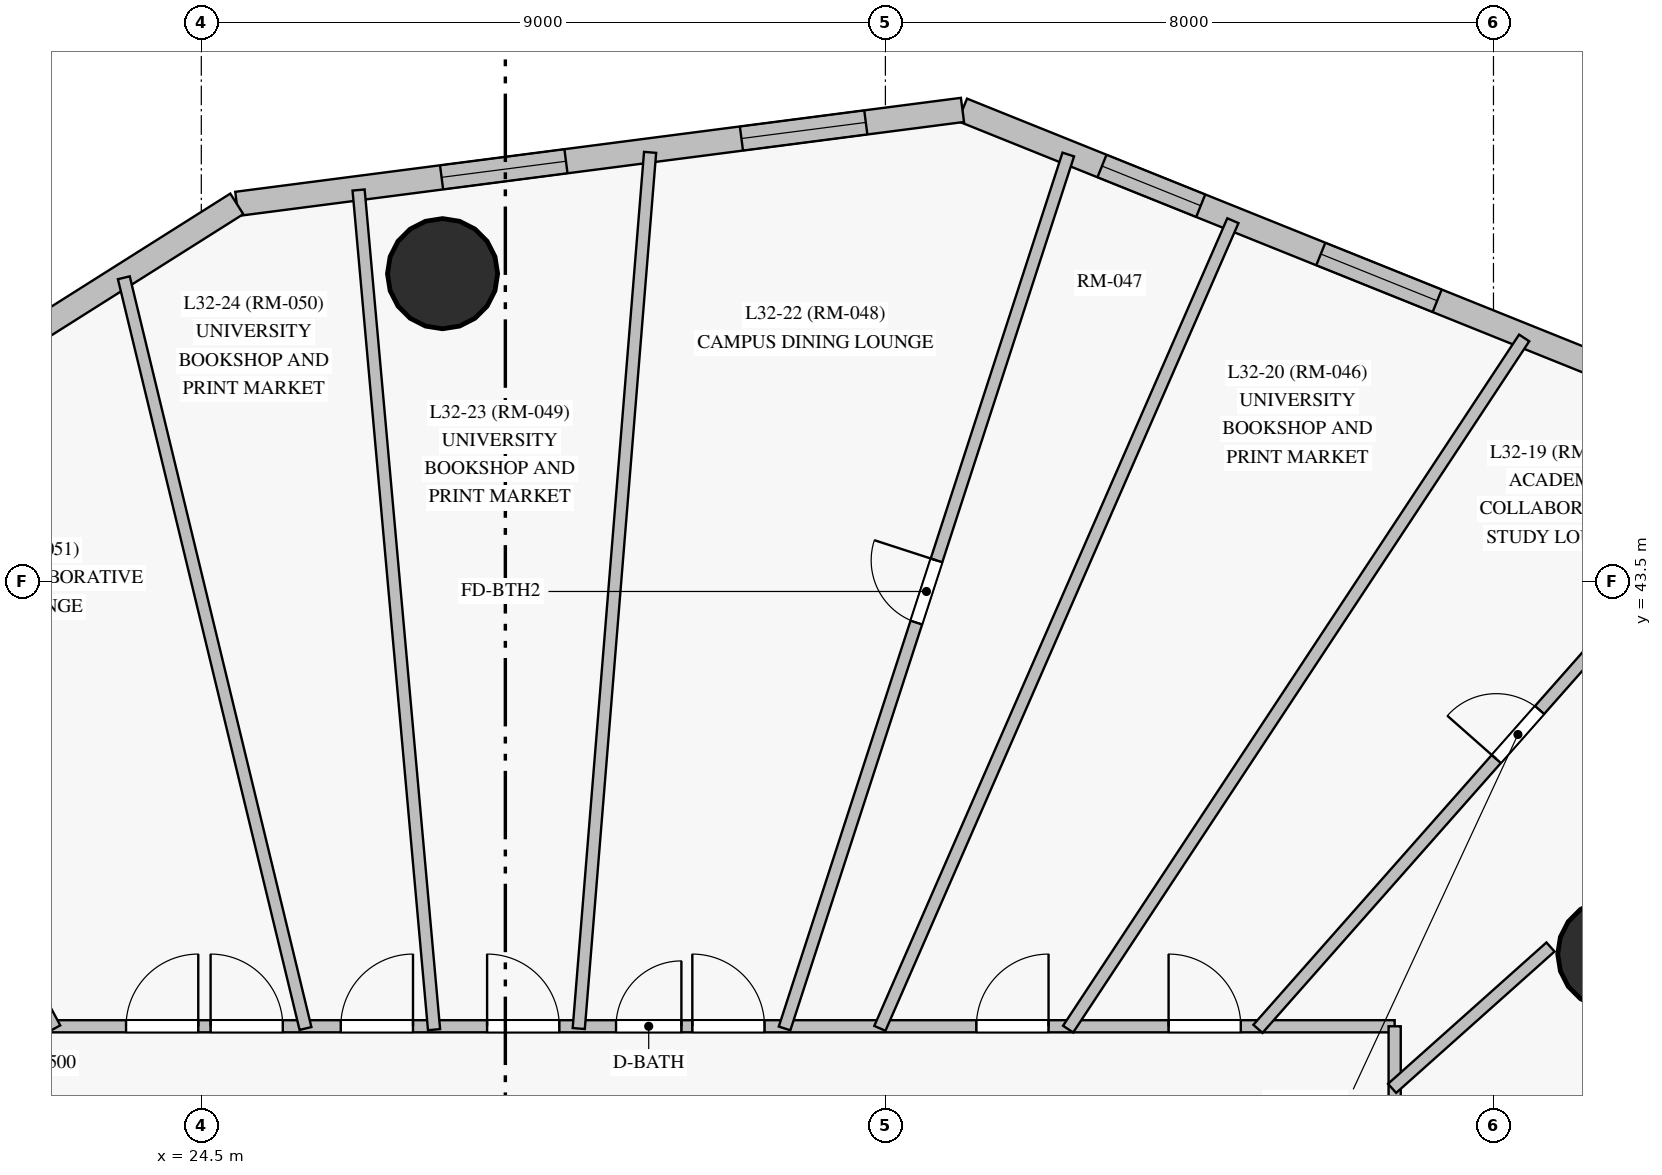
"""IFC4 building model, lengths in metres.
Left out: names, types, materials, properties, quantities, classifications, styles, units other than length and angle.
Written with IfcOpenShell. Run it as: python <this file> out.ifc"""

import sys

from ifc_helpers import new_model, si_unit, direction, frame, frame_2d, origin, origin_with_axes, origin_2d, place, context, subcontext, project, spatial, rectangle, circle, extrude, source, transform, mapped, element, fill, save


model = new_model("IFC4")
c1 = context("Model", 3, precision=1e-05, world=origin(), true_north=direction((0.0, 1.0)))
c2 = subcontext(c1, "Body", "Model", "MODEL_VIEW")
j1 = project(units=[si_unit("LENGTHUNIT", "METRE"), si_unit("PLANEANGLEUNIT", "RADIAN")], contexts=[c1])
p1 = place(None, origin())
s1 = spatial("IfcSite", under=j1, at=p1, CompositionType="ELEMENT")
p2 = place(p1, origin())
s2 = spatial("IfcBuilding", under=s1, at=p2, CompositionType="ELEMENT")
p3 = place(p2, frame((0.0, 0.0, 117.55)))
s3 = spatial("IfcBuildingStorey", under=s2, at=p3, CompositionType="ELEMENT", Elevation=117.55)
m1 = source(origin_with_axes(), c2, "Body", "SweptSolid", [
    extrude(circle(Radius=0.725, at=origin_2d()), origin(), (0.0, 0.0, 1.0), 3.05),
])
for number, where, z_axis, x_axis in (
    (1, (43.07, 38.6, 0.0), (0.0, 0.0, 1.0), (1.0, 0.0, 0.0)),
    (2, (27.674, 47.551, 0.0), (0.0, 0.0, 1.0), (1.0, 0.0, 0.0)),
):
    element("IfcColumn", number, at=place(p3, frame(where, z_axis=z_axis, x_axis=x_axis)), inside=s3, PredefinedType="COLUMN", context=c2, shape_type="MappedRepresentation", body=[
        mapped(m1, transform((0.0, 0.0, 0.0), scale=1.0)),
    ])
p4 = place(p3, frame((45.639, 45.232, 0.0), z_axis=(0.0, 0.0, 1.0), x_axis=(-0.927788462826, 0.373106644603, 0.0)))
e3 = element("IfcWall", 3, at=p4, inside=s3, PredefinedType="SOLIDWALL", context=c2, shape_type="SweptSolid", body=[
    extrude(rectangle(XDim=11.991, YDim=0.32, at=frame_2d((5.996, 0.0))), origin(), (0.0, 0.0, 1.0), 2.825),
])
p5 = place(p4, frame((1.4, 0.0, 0.85)))
e4 = element("IfcOpeningElement", 4, at=p5, cuts=e3, PredefinedType="OPENING", context=c2, shape_type="SweptSolid", body=[
    extrude(rectangle(XDim=1.65, YDim=1.65, at=frame_2d((0.825, 0.825))), frame((0.0, 0.17, 0.0), z_axis=(0.0, -1.0, 0.0), x_axis=(1.0, 0.0, 0.0)), (0.0, 0.0, 1.0), 0.34),
])
p6 = place(p4, frame((5.26, 0.0, 0.85)))
e5 = element("IfcOpeningElement", 5, at=p6, cuts=e3, PredefinedType="OPENING", context=c2, shape_type="SweptSolid", body=[
    extrude(rectangle(XDim=1.65, YDim=1.65, at=frame_2d((0.825, 0.825))), frame((0.0, 0.17, 0.0), z_axis=(0.0, -1.0, 0.0), x_axis=(1.0, 0.0, 0.0)), (0.0, 0.0, 1.0), 0.34),
])
p7 = place(p4, frame((8.613, 0.0, 0.85)))
e6 = element("IfcOpeningElement", 6, at=p7, cuts=e3, PredefinedType="OPENING", context=c2, shape_type="SweptSolid", body=[
    extrude(rectangle(XDim=1.4, YDim=1.65, at=frame_2d((0.7, 0.825))), frame((0.0, 0.17, 0.0), z_axis=(0.0, -1.0, 0.0), x_axis=(1.0, 0.0, 0.0)), (0.0, 0.0, 1.0), 0.34),
])
p8 = place(p3, frame((34.514, 49.706, 0.0), z_axis=(0.0, 0.0, 1.0), x_axis=(-0.991719202809, -0.128425164123, 0.0)))
e7 = element("IfcWall", 7, at=p8, inside=s3, PredefinedType="SOLIDWALL", context=c2, shape_type="SweptSolid", body=[
    extrude(rectangle(XDim=9.627, YDim=0.32, at=frame_2d((4.813, 0.0))), origin(), (0.0, 0.0, 1.0), 2.825),
])
p9 = place(p8, frame((1.282, 0.0, 0.85)))
e8 = element("IfcOpeningElement", 8, at=p9, cuts=e7, PredefinedType="OPENING", context=c2, shape_type="SweptSolid", body=[
    extrude(rectangle(XDim=1.65, YDim=1.65, at=frame_2d((0.825, 0.825))), frame((0.0, 0.17, 0.0), z_axis=(0.0, -1.0, 0.0), x_axis=(1.0, 0.0, 0.0)), (0.0, 0.0, 1.0), 0.34),
])
p10 = place(p8, frame((5.26, 0.0, 0.85)))
e9 = element("IfcOpeningElement", 9, at=p10, cuts=e7, PredefinedType="OPENING", context=c2, shape_type="SweptSolid", body=[
    extrude(rectangle(XDim=1.65, YDim=1.65, at=frame_2d((0.825, 0.825))), frame((0.0, 0.17, 0.0), z_axis=(0.0, -1.0, 0.0), x_axis=(1.0, 0.0, 0.0)), (0.0, 0.0, 1.0), 0.34),
])
p11 = place(p3, frame((24.967, 48.469, 0.0), z_axis=(0.0, 0.0, 1.0), x_axis=(-0.845484322543, -0.534000243758, 0.0)))
e10 = element("IfcWall", 10, at=p11, inside=s3, PredefinedType="SOLIDWALL", context=c2, shape_type="SweptSolid", body=[
    extrude(rectangle(XDim=13.932, YDim=0.32, at=frame_2d((6.966, 0.0))), origin(), (0.0, 0.0, 1.0), 2.825),
])
p12 = place(p11, frame((3.705, 0.0, 0.85)))
e11 = element("IfcOpeningElement", 11, at=p12, cuts=e10, PredefinedType="OPENING", context=c2, shape_type="SweptSolid", body=[
    extrude(rectangle(XDim=1.65, YDim=1.65, at=frame_2d((0.825, 0.825))), frame((0.0, 0.17, 0.0), z_axis=(0.0, -1.0, 0.0), x_axis=(1.0, 0.0, 0.0)), (0.0, 0.0, 1.0), 0.34),
])
p13 = place(p11, frame((9.747, 0.0, 0.85)))
e12 = element("IfcOpeningElement", 12, at=p13, cuts=e10, PredefinedType="OPENING", context=c2, shape_type="SweptSolid", body=[
    extrude(rectangle(XDim=1.65, YDim=1.65, at=frame_2d((0.825, 0.825))), frame((0.0, 0.17, 0.0), z_axis=(0.0, -1.0, 0.0), x_axis=(1.0, 0.0, 0.0)), (0.0, 0.0, 1.0), 0.34),
])
p14 = place(p3, frame((16.7, 37.65, 0.0), z_axis=(0.0, 0.0, 1.0), x_axis=(1.0, 0.0, 0.0)))
e13 = element("IfcWall", 13, at=p14, inside=s3, PredefinedType="PARTITIONING", context=c2, shape_type="SweptSolid", body=[
    extrude(rectangle(XDim=23.5, YDim=0.16, at=frame_2d((11.75, 0.0))), origin(), (0.0, 0.0, 1.0), 2.325),
])
p15 = place(p14, frame((20.526, 0.0, 0.0)))
e14 = element("IfcOpeningElement", 14, at=p15, cuts=e13, PredefinedType="OPENING", context=c2, shape_type="SweptSolid", body=[
    extrude(rectangle(XDim=0.95, YDim=2.15, at=frame_2d((0.475, 1.075))), frame((0.0, 0.09, 0.0), z_axis=(0.0, -1.0, 0.0), x_axis=(1.0, 0.0, 0.0)), (0.0, 0.0, 1.0), 0.18),
])
p16 = place(p14, frame((17.997, 0.0, 0.0)))
e15 = element("IfcOpeningElement", 15, at=p16, cuts=e13, PredefinedType="OPENING", context=c2, shape_type="SweptSolid", body=[
    extrude(rectangle(XDim=0.95, YDim=2.15, at=frame_2d((0.475, 1.075))), frame((0.0, 0.09, 0.0), z_axis=(0.0, -1.0, 0.0), x_axis=(1.0, 0.0, 0.0)), (0.0, 0.0, 1.0), 0.18),
])
p17 = place(p14, frame((14.26, 0.0, 0.0)))
e16 = element("IfcOpeningElement", 16, at=p17, cuts=e13, PredefinedType="OPENING", context=c2, shape_type="SweptSolid", body=[
    extrude(rectangle(XDim=0.95, YDim=2.15, at=frame_2d((0.475, 1.075))), frame((0.0, 0.09, 0.0), z_axis=(0.0, -1.0, 0.0), x_axis=(1.0, 0.0, 0.0)), (0.0, 0.0, 1.0), 0.18),
])
p18 = place(p14, frame((13.256, 0.0, 0.0)))
e17 = element("IfcOpeningElement", 17, at=p18, cuts=e13, PredefinedType="OPENING", context=c2, shape_type="SweptSolid", body=[
    extrude(rectangle(XDim=0.86, YDim=2.1, at=frame_2d((0.43, 1.05))), frame((0.0, 0.09, 0.0), z_axis=(0.0, -1.0, 0.0), x_axis=(1.0, 0.0, 0.0)), (0.0, 0.0, 1.0), 0.18),
])
p19 = place(p14, frame((11.56, 0.0, 0.0)))
e18 = element("IfcOpeningElement", 18, at=p19, cuts=e13, PredefinedType="OPENING", context=c2, shape_type="SweptSolid", body=[
    extrude(rectangle(XDim=0.95, YDim=2.15, at=frame_2d((0.475, 1.075))), frame((0.0, 0.09, 0.0), z_axis=(0.0, -1.0, 0.0), x_axis=(1.0, 0.0, 0.0)), (0.0, 0.0, 1.0), 0.18),
])
p20 = place(p14, frame((9.635, 0.0, 0.0)))
e19 = element("IfcOpeningElement", 19, at=p20, cuts=e13, PredefinedType="OPENING", context=c2, shape_type="SweptSolid", body=[
    extrude(rectangle(XDim=0.95, YDim=2.15, at=frame_2d((0.475, 1.075))), frame((0.0, 0.09, 0.0), z_axis=(0.0, -1.0, 0.0), x_axis=(1.0, 0.0, 0.0)), (0.0, 0.0, 1.0), 0.18),
])
p21 = place(p14, frame((7.922, 0.0, 0.0)))
e20 = element("IfcOpeningElement", 20, at=p21, cuts=e13, PredefinedType="OPENING", context=c2, shape_type="SweptSolid", body=[
    extrude(rectangle(XDim=0.95, YDim=2.15, at=frame_2d((0.475, 1.075))), frame((0.0, 0.09, 0.0), z_axis=(0.0, -1.0, 0.0), x_axis=(1.0, 0.0, 0.0)), (0.0, 0.0, 1.0), 0.18),
])
p22 = place(p14, frame((6.81, 0.0, 0.0)))
e21 = element("IfcOpeningElement", 21, at=p22, cuts=e13, PredefinedType="OPENING", context=c2, shape_type="SweptSolid", body=[
    extrude(rectangle(XDim=0.95, YDim=2.15, at=frame_2d((0.475, 1.075))), frame((0.0, 0.09, 0.0), z_axis=(0.0, -1.0, 0.0), x_axis=(1.0, 0.0, 0.0)), (0.0, 0.0, 1.0), 0.18),
])
p23 = place(p14, frame((2.856, 0.0, 0.0)))
e22 = element("IfcOpeningElement", 22, at=p23, cuts=e13, PredefinedType="OPENING", context=c2, shape_type="SweptSolid", body=[
    extrude(rectangle(XDim=0.95, YDim=2.15, at=frame_2d((0.475, 1.075))), frame((0.0, 0.09, 0.0), z_axis=(0.0, -1.0, 0.0), x_axis=(1.0, 0.0, 0.0)), (0.0, 0.0, 1.0), 0.18),
])
p24 = place(p3, frame((40.2, 37.65, 0.0), z_axis=(0.0, 0.0, 1.0), x_axis=(0.0, -1.0, 0.0)))
e23 = element("IfcWall", 23, at=p24, inside=s3, PredefinedType="PARTITIONING", context=c2, shape_type="SweptSolid", body=[
    extrude(rectangle(XDim=22.3, YDim=0.16, at=frame_2d((11.15, 0.0))), origin(), (0.0, 0.0, 1.0), 2.325),
])
p25 = place(p24, frame((14.02, 0.0, 0.0)))
e24 = element("IfcOpeningElement", 24, at=p25, cuts=e23, PredefinedType="OPENING", context=c2, shape_type="SweptSolid", body=[
    extrude(rectangle(XDim=0.95, YDim=2.15, at=frame_2d((0.475, 1.075))), frame((0.0, 0.09, 0.0), z_axis=(0.0, -1.0, 0.0), x_axis=(1.0, 0.0, 0.0)), (0.0, 0.0, 1.0), 0.18),
])
p26 = place(p24, frame((10.675, 0.0, 0.0)))
e25 = element("IfcOpeningElement", 25, at=p26, cuts=e23, PredefinedType="OPENING", context=c2, shape_type="SweptSolid", body=[
    extrude(rectangle(XDim=0.95, YDim=2.15, at=frame_2d((0.475, 1.075))), frame((0.0, 0.09, 0.0), z_axis=(0.0, -1.0, 0.0), x_axis=(1.0, 0.0, 0.0)), (0.0, 0.0, 1.0), 0.18),
])
p27 = place(p24, frame((7.33, 0.0, 0.0)))
e26 = element("IfcOpeningElement", 26, at=p27, cuts=e23, PredefinedType="OPENING", context=c2, shape_type="SweptSolid", body=[
    extrude(rectangle(XDim=0.95, YDim=2.15, at=frame_2d((0.475, 1.075))), frame((0.0, 0.09, 0.0), z_axis=(0.0, -1.0, 0.0), x_axis=(1.0, 0.0, 0.0)), (0.0, 0.0, 1.0), 0.18),
])
p28 = place(p24, frame((5.1, 0.0, 0.0)))
e27 = element("IfcOpeningElement", 27, at=p28, cuts=e23, PredefinedType="OPENING", context=c2, shape_type="SweptSolid", body=[
    extrude(rectangle(XDim=0.95, YDim=2.15, at=frame_2d((0.475, 1.075))), frame((0.0, 0.09, 0.0), z_axis=(0.0, -1.0, 0.0), x_axis=(1.0, 0.0, 0.0)), (0.0, 0.0, 1.0), 0.18),
])
p29 = place(p24, frame((1.548, 0.0, 0.0)))
e28 = element("IfcOpeningElement", 28, at=p29, cuts=e23, PredefinedType="OPENING", context=c2, shape_type="SweptSolid", body=[
    extrude(rectangle(XDim=0.95, YDim=2.15, at=frame_2d((0.475, 1.075))), frame((0.0, 0.09, 0.0), z_axis=(0.0, -1.0, 0.0), x_axis=(1.0, 0.0, 0.0)), (0.0, 0.0, 1.0), 0.18),
])
p30 = place(p3, frame((32.174, 37.622, 0.0), z_axis=(0.0, 0.0, 1.0), x_axis=(0.30877139815, 0.95113628029, 0.0)))
e29 = element("IfcWall", 29, at=p30, inside=s3, PredefinedType="PARTITIONING", context=c2, shape_type="SweptSolid", body=[
    extrude(rectangle(XDim=12.088, YDim=0.16, at=frame_2d((6.044, 0.0))), origin(), (0.0, 0.0, 1.0), 2.825),
])
p31 = place(p30, frame((5.614, 0.0, 0.0)))
e30 = element("IfcOpeningElement", 30, at=p31, cuts=e29, PredefinedType="OPENING", context=c2, shape_type="SweptSolid", body=[
    extrude(rectangle(XDim=0.86, YDim=2.04, at=frame_2d((0.43, 1.02))), frame((0.0, 0.09, 0.0), z_axis=(0.0, -1.0, 0.0), x_axis=(1.0, 0.0, 0.0)), (0.0, 0.0, 1.0), 0.18),
])
p32 = place(p3, frame((33.427, 37.623, 0.0), z_axis=(0.0, 0.0, 1.0), x_axis=(0.400520613266, 0.916287748663, 0.0)))
e31 = element("IfcWall", 31, at=p32, inside=s3, PredefinedType="PARTITIONING", context=c2, shape_type="SweptSolid", body=[
    extrude(rectangle(XDim=11.596, YDim=0.16, at=frame_2d((5.798, 0.0))), origin(), (0.0, 0.0, 1.0), 2.825),
])
p33 = place(p3, frame((29.466, 37.62, 0.0), z_axis=(0.0, 0.0, 1.0), x_axis=(0.081148022253, 0.996702061042, 0.0)))
e32 = element("IfcWall", 32, at=p33, inside=s3, PredefinedType="PARTITIONING", context=c2, shape_type="SweptSolid", body=[
    extrude(rectangle(XDim=11.565, YDim=0.16, at=frame_2d((5.782, 0.0))), origin(), (0.0, 0.0, 1.0), 2.825),
])
p34 = place(p3, frame((27.562, 37.605, 0.0), z_axis=(0.0, 0.0, 1.0), x_axis=(-0.089503626706, 0.995986496297, 0.0)))
e33 = element("IfcWall", 33, at=p34, inside=s3, PredefinedType="PARTITIONING", context=c2, shape_type="SweptSolid", body=[
    extrude(rectangle(XDim=11.091, YDim=0.16, at=frame_2d((5.545, 0.0))), origin(), (0.0, 0.0, 1.0), 2.225),
])
p35 = place(p3, frame((35.904, 37.613, 0.0), z_axis=(0.0, 0.0, 1.0), x_axis=(0.550742924519, 0.8346749254, 0.0)))
e34 = element("IfcWall", 34, at=p35, inside=s3, PredefinedType="PARTITIONING", context=c2, shape_type="SweptSolid", body=[
    extrude(rectangle(XDim=10.894, YDim=0.16, at=frame_2d((5.447, 0.0))), origin(), (0.0, 0.0, 1.0), 2.825),
])
p36 = place(p3, frame((38.401, 37.616, 0.0), z_axis=(0.0, 0.0, 1.0), x_axis=(0.662096599454, 0.749418503236, 0.0)))
e35 = element("IfcWall", 35, at=p36, inside=s3, PredefinedType="PARTITIONING", context=c2, shape_type="SweptSolid", body=[
    extrude(rectangle(XDim=10.333, YDim=0.16, at=frame_2d((5.167, 0.0))), origin(), (0.0, 0.0, 1.0), 2.825),
])
p37 = place(p36, frame((4.737, 0.0, 0.0)))
e36 = element("IfcOpeningElement", 36, at=p37, cuts=e35, PredefinedType="OPENING", context=c2, shape_type="SweptSolid", body=[
    extrude(rectangle(XDim=0.86, YDim=2.04, at=frame_2d((0.43, 1.02))), frame((0.0, 0.09, 0.0), z_axis=(0.0, -1.0, 0.0), x_axis=(1.0, 0.0, 0.0)), (0.0, 0.0, 1.0), 0.18),
])
p38 = place(p3, frame((25.871, 37.621, 0.0), z_axis=(0.0, 0.0, 1.0), x_axis=(-0.235190853666, 0.971949207702, 0.0)))
e37 = element("IfcWall", 37, at=p38, inside=s3, PredefinedType="PARTITIONING", context=c2, shape_type="SweptSolid", body=[
    extrude(rectangle(XDim=10.162, YDim=0.16, at=frame_2d((5.081, 0.0))), origin(), (0.0, 0.0, 1.0), 2.825),
])
p39 = place(p3, frame((40.162, 34.098, 0.0), z_axis=(0.0, 0.0, 1.0), x_axis=(0.835508327982, 0.549477782874, 0.0)))
e38 = element("IfcWall", 38, at=p39, inside=s3, PredefinedType="PARTITIONING", context=c2, shape_type="SweptSolid", body=[
    extrude(rectangle(XDim=9.892, YDim=0.16, at=frame_2d((4.946, 0.0))), origin(), (0.0, 0.0, 1.0), 2.825),
])
p40 = place(p3, frame((22.574, 37.624, 0.0), z_axis=(0.0, 0.0, 1.0), x_axis=(-0.474347188847, 0.880337858116, 0.0)))
e39 = element("IfcWall", 39, at=p40, inside=s3, PredefinedType="PARTITIONING", context=c2, shape_type="SweptSolid", body=[
    extrude(rectangle(XDim=7.886, YDim=0.16, at=frame_2d((3.943, 0.0))), origin(), (0.0, 0.0, 1.0), 2.825),
])
p41 = place(p3, frame((40.167, 36.833, 0.0), z_axis=(0.0, 0.0, 1.0), x_axis=(0.746009004767, 0.665935856376, 0.0)))
e40 = element("IfcWall", 40, at=p41, inside=s3, PredefinedType="PARTITIONING", context=c2, shape_type="SweptSolid", body=[
    extrude(rectangle(XDim=2.793, YDim=0.16, at=frame_2d((1.396, 0.0))), origin(), (0.0, 0.0, 1.0), 2.225),
])
m2 = source(origin_with_axes(), c2, "Body", "SweptSolid", [
    extrude(rectangle(XDim=1.65, YDim=1.65, at=frame_2d((0.825, 0.825))), frame((0.0, 0.03, 0.0), z_axis=(0.0, -1.0, 0.0), x_axis=(1.0, 0.0, 0.0)), (0.0, 0.0, 1.0), 0.06),
])
p42 = place(p6, origin())
e41 = element("IfcWindow", 41, at=p42, inside=s3, PartitioningType="SINGLE_PANEL", PredefinedType="WINDOW", context=c2, shape_type="MappedRepresentation", body=[
    mapped(m2, transform((0.0, 0.0, 0.0), scale=1.0)),
])
fill(e5, e41)
m3 = source(origin_with_axes(), c2, "Body", "SweptSolid", [
    extrude(rectangle(XDim=1.4, YDim=1.65, at=frame_2d((0.7, 0.825))), frame((0.0, 0.03, 0.0), z_axis=(0.0, -1.0, 0.0), x_axis=(1.0, 0.0, 0.0)), (0.0, 0.0, 1.0), 0.06),
])
p43 = place(p7, origin())
e42 = element("IfcWindow", 42, at=p43, inside=s3, PartitioningType="SINGLE_PANEL", PredefinedType="WINDOW", context=c2, shape_type="MappedRepresentation", body=[
    mapped(m3, transform((0.0, 0.0, 0.0), scale=1.0)),
])
fill(e6, e42)
p44 = place(p9, origin())
e43 = element("IfcWindow", 43, at=p44, inside=s3, PartitioningType="SINGLE_PANEL", PredefinedType="WINDOW", context=c2, shape_type="MappedRepresentation", body=[
    mapped(m2, transform((0.0, 0.0, 0.0), scale=1.0)),
])
fill(e8, e43)
p45 = place(p10, origin())
e44 = element("IfcWindow", 44, at=p45, inside=s3, PartitioningType="SINGLE_PANEL", PredefinedType="WINDOW", context=c2, shape_type="MappedRepresentation", body=[
    mapped(m2, transform((0.0, 0.0, 0.0), scale=1.0)),
])
fill(e9, e44)
m4 = source(origin_with_axes(), c2, "Body", "SweptSolid", [
    extrude(rectangle(XDim=0.95, YDim=2.15, at=frame_2d((0.475, 1.075))), frame((0.0, 0.025, 0.0), z_axis=(0.0, -1.0, 0.0), x_axis=(1.0, 0.0, 0.0)), (0.0, 0.0, 1.0), 0.05),
])
p46 = place(p15, origin())
e45 = element("IfcDoor", 45, at=p46, inside=s3, OperationType="SINGLE_SWING_LEFT", PredefinedType="DOOR", context=c2, shape_type="MappedRepresentation", body=[
    mapped(m4, transform((0.0, 0.0, 0.0), scale=1.0)),
])
fill(e14, e45)
p47 = place(p16, origin())
e46 = element("IfcDoor", 46, at=p47, inside=s3, OperationType="SINGLE_SWING_RIGHT", PredefinedType="DOOR", context=c2, shape_type="MappedRepresentation", body=[
    mapped(m4, transform((0.0, 0.0, 0.0), scale=1.0)),
])
fill(e15, e46)
p48 = place(p17, origin())
e47 = element("IfcDoor", 47, at=p48, inside=s3, OperationType="SINGLE_SWING_LEFT", PredefinedType="DOOR", context=c2, shape_type="MappedRepresentation", body=[
    mapped(m4, transform((0.0, 0.0, 0.0), scale=1.0)),
])
fill(e16, e47)
m5 = source(origin_with_axes(), c2, "Body", "SweptSolid", [
    extrude(rectangle(XDim=0.86, YDim=2.1, at=frame_2d((0.43, 1.05))), frame((0.0, 0.025, 0.0), z_axis=(0.0, -1.0, 0.0), x_axis=(1.0, 0.0, 0.0)), (0.0, 0.0, 1.0), 0.05),
])
p49 = place(p18, origin())
e48 = element("IfcDoor", 48, at=p49, inside=s3, OperationType="SINGLE_SWING_RIGHT", PredefinedType="DOOR", context=c2, shape_type="MappedRepresentation", body=[
    mapped(m5, transform((0.0, 0.0, 0.0), scale=1.0)),
])
fill(e17, e48)
p50 = place(p19, origin())
e49 = element("IfcDoor", 49, at=p50, inside=s3, OperationType="SINGLE_SWING_LEFT", PredefinedType="DOOR", context=c2, shape_type="MappedRepresentation", body=[
    mapped(m4, transform((0.0, 0.0, 0.0), scale=1.0)),
])
fill(e18, e49)
p51 = place(p20, origin())
e50 = element("IfcDoor", 50, at=p51, inside=s3, OperationType="SINGLE_SWING_RIGHT", PredefinedType="DOOR", context=c2, shape_type="MappedRepresentation", body=[
    mapped(m4, transform((0.0, 0.0, 0.0), scale=1.0)),
])
fill(e19, e50)
p52 = place(p21, origin())
e51 = element("IfcDoor", 51, at=p52, inside=s3, OperationType="SINGLE_SWING_LEFT", PredefinedType="DOOR", context=c2, shape_type="MappedRepresentation", body=[
    mapped(m4, transform((0.0, 0.0, 0.0), scale=1.0)),
])
fill(e20, e51)
p53 = place(p22, origin())
e52 = element("IfcDoor", 52, at=p53, inside=s3, OperationType="SINGLE_SWING_RIGHT", PredefinedType="DOOR", context=c2, shape_type="MappedRepresentation", body=[
    mapped(m4, transform((0.0, 0.0, 0.0), scale=1.0)),
])
fill(e21, e52)
m6 = source(origin_with_axes(), c2, "Body", "SweptSolid", [
    extrude(rectangle(XDim=0.86, YDim=2.04, at=frame_2d((0.43, 1.02))), frame((0.0, 0.025, 0.0), z_axis=(0.0, -1.0, 0.0), x_axis=(1.0, 0.0, 0.0)), (0.0, 0.0, 1.0), 0.05),
])
p54 = place(p37, origin())
e53 = element("IfcDoor", 53, at=p54, inside=s3, OperationType="SINGLE_SWING_LEFT", PredefinedType="DOOR", context=c2, shape_type="MappedRepresentation", body=[
    mapped(m6, transform((0.0, 0.0, 0.0), scale=1.0)),
])
fill(e36, e53)
p55 = place(p31, origin())
e54 = element("IfcDoor", 54, at=p55, inside=s3, OperationType="SINGLE_SWING_RIGHT", PredefinedType="DOOR", context=c2, shape_type="MappedRepresentation", body=[
    mapped(m6, transform((0.0, 0.0, 0.0), scale=1.0)),
])
fill(e30, e54)
save(model, sys.argv[1])
